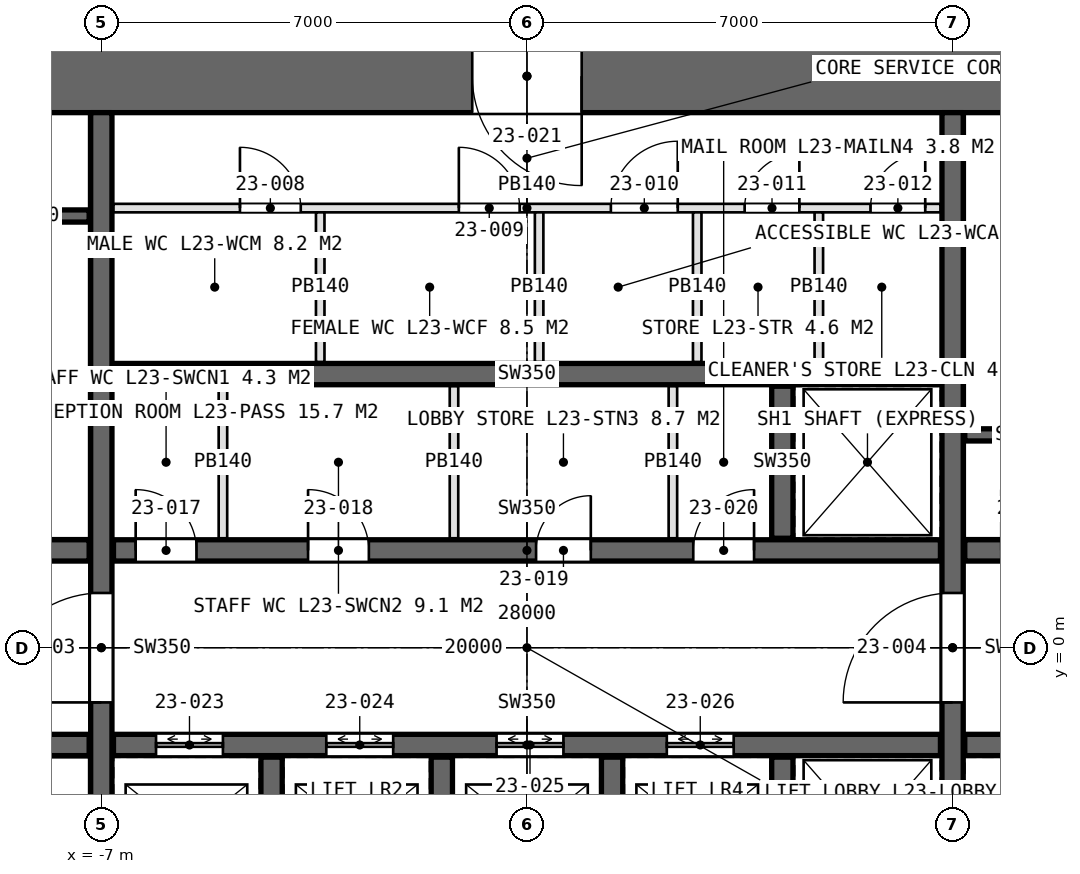
"""IFC4 building model, lengths in metres.
Left out: names, types, materials, properties, quantities, classifications, styles, units other than length and angle.
Written with IfcOpenShell. Run it as: python <this file> out.ifc"""

import sys

from ifc_helpers import new_model, si_unit, direction, frame, frame_2d, origin, place, context, subcontext, project, spatial, rectangle, extrude, element, fill, save


model = new_model("IFC4")
c1 = context("Model", 3, precision=1e-05, world=origin(), true_north=direction((0.0, 1.0)))
c2 = subcontext(c1, "Body", "Model", "MODEL_VIEW")
j1 = project(units=[si_unit("LENGTHUNIT", "METRE"), si_unit("PLANEANGLEUNIT", "RADIAN")], contexts=[c1])
p1 = place(None, origin())
s1 = spatial("IfcSite", under=j1, at=p1, CompositionType="ELEMENT")
p2 = place(p1, origin())
s2 = spatial("IfcBuilding", under=s1, at=p2, CompositionType="ELEMENT")
p3 = place(p2, frame((0.0, 0.0, 113.4)))
s3 = spatial("IfcBuildingStorey", under=s2, at=p3, CompositionType="ELEMENT", Elevation=113.4)
p4 = place(p3, frame((14.0, 9.4, 0.0), z_axis=(0.0, 0.0, 1.0), x_axis=(-1.0, 0.0, 0.0)))
e1 = element("IfcWall", 1, at=p4, inside=s3, PredefinedType="SHEAR", context=c2, shape_type="SweptSolid", body=[
    extrude(rectangle(XDim=28.0, YDim=1.2, at=frame_2d((14.0, 0.0))), origin(), (0.0, 0.0, 1.0), 4.2),
])
p5 = place(p4, frame((24.0, 0.0, 0.0)))
e2 = element("IfcOpeningElement", 2, at=p5, cuts=e1, PredefinedType="OPENING", context=c2, shape_type="SweptSolid", body=[
    extrude(rectangle(XDim=1.0, YDim=2.4, at=frame_2d((0.5, 1.2))), frame((0.0, 0.61, 0.0), z_axis=(0.0, -1.0, 0.0), x_axis=(1.0, 0.0, 0.0)), (0.0, 0.0, 1.0), 1.22),
])
p6 = place(p4, frame((13.1, 0.0, 0.0)))
e3 = element("IfcOpeningElement", 3, at=p6, cuts=e1, PredefinedType="OPENING", context=c2, shape_type="SweptSolid", body=[
    extrude(rectangle(XDim=1.8, YDim=2.4, at=frame_2d((0.9, 1.2))), frame((0.0, 0.61, 0.0), z_axis=(0.0, -1.0, 0.0), x_axis=(1.0, 0.0, 0.0)), (0.0, 0.0, 1.0), 1.22),
])
p7 = place(p3, frame((-7.0, -8.8, 0.0), z_axis=(0.0, 0.0, 1.0), x_axis=(0.0, 1.0, 0.0)))
e4 = element("IfcWall", 4, at=p7, inside=s3, PredefinedType="SHEAR", context=c2, shape_type="SweptSolid", body=[
    extrude(rectangle(XDim=17.6, YDim=0.35, at=frame_2d((8.8, 0.0))), origin(), (0.0, 0.0, 1.0), 4.2),
])
p8 = place(p7, frame((7.9, 0.0, 0.0)))
e5 = element("IfcOpeningElement", 5, at=p8, cuts=e4, PredefinedType="OPENING", context=c2, shape_type="SweptSolid", body=[
    extrude(rectangle(XDim=1.8, YDim=2.4, at=frame_2d((0.9, 1.2))), frame((0.0, 0.185, 0.0), z_axis=(0.0, -1.0, 0.0), x_axis=(1.0, 0.0, 0.0)), (0.0, 0.0, 1.0), 0.37),
])
p9 = place(p3, frame((7.0, -8.8, 0.0), z_axis=(0.0, 0.0, 1.0), x_axis=(0.0, 1.0, 0.0)))
e6 = element("IfcWall", 6, at=p9, inside=s3, PredefinedType="SHEAR", context=c2, shape_type="SweptSolid", body=[
    extrude(rectangle(XDim=17.6, YDim=0.35, at=frame_2d((8.8, 0.0))), origin(), (0.0, 0.0, 1.0), 4.2),
])
p10 = place(p9, frame((7.9, 0.0, 0.0)))
e7 = element("IfcOpeningElement", 7, at=p10, cuts=e6, PredefinedType="OPENING", context=c2, shape_type="SweptSolid", body=[
    extrude(rectangle(XDim=1.8, YDim=2.4, at=frame_2d((0.9, 1.2))), frame((0.0, 0.185, 0.0), z_axis=(0.0, -1.0, 0.0), x_axis=(1.0, 0.0, 0.0)), (0.0, 0.0, 1.0), 0.37),
])
p11 = place(p3, frame((-6.8, 1.6, 0.0), z_axis=(0.0, 0.0, 1.0), x_axis=(1.0, 0.0, 0.0)))
e8 = element("IfcWall", 8, at=p11, inside=s3, PredefinedType="SHEAR", context=c2, shape_type="SweptSolid", body=[
    extrude(rectangle(XDim=13.6, YDim=0.35, at=frame_2d((6.8, 0.0))), origin(), (0.0, 0.0, 1.0), 4.2),
])
p12 = place(p11, frame((0.365, 0.0, 0.0)))
e9 = element("IfcOpeningElement", 9, at=p12, cuts=e8, PredefinedType="OPENING", context=c2, shape_type="SweptSolid", body=[
    extrude(rectangle(XDim=1.0, YDim=2.4, at=frame_2d((0.5, 1.2))), frame((0.0, 0.185, 0.0), z_axis=(0.0, -1.0, 0.0), x_axis=(1.0, 0.0, 0.0)), (0.0, 0.0, 1.0), 0.37),
])
p13 = place(p11, frame((3.2, 0.0, 0.0)))
e10 = element("IfcOpeningElement", 10, at=p13, cuts=e8, PredefinedType="OPENING", context=c2, shape_type="SweptSolid", body=[
    extrude(rectangle(XDim=1.0, YDim=2.4, at=frame_2d((0.5, 1.2))), frame((0.0, 0.185, 0.0), z_axis=(0.0, -1.0, 0.0), x_axis=(1.0, 0.0, 0.0)), (0.0, 0.0, 1.0), 0.37),
])
p14 = place(p11, frame((6.95, 0.0, 0.0)))
e11 = element("IfcOpeningElement", 11, at=p14, cuts=e8, PredefinedType="OPENING", context=c2, shape_type="SweptSolid", body=[
    extrude(rectangle(XDim=0.9, YDim=2.4, at=frame_2d((0.45, 1.2))), frame((0.0, 0.185, 0.0), z_axis=(0.0, -1.0, 0.0), x_axis=(1.0, 0.0, 0.0)), (0.0, 0.0, 1.0), 0.37),
])
p15 = place(p11, frame((9.535, 0.0, 0.0)))
e12 = element("IfcOpeningElement", 12, at=p15, cuts=e8, PredefinedType="OPENING", context=c2, shape_type="SweptSolid", body=[
    extrude(rectangle(XDim=1.0, YDim=2.4, at=frame_2d((0.5, 1.2))), frame((0.0, 0.185, 0.0), z_axis=(0.0, -1.0, 0.0), x_axis=(1.0, 0.0, 0.0)), (0.0, 0.0, 1.0), 0.37),
])
p16 = place(p3, frame((-6.8, -1.6, 0.0), z_axis=(0.0, 0.0, 1.0), x_axis=(1.0, 0.0, 0.0)))
e13 = element("IfcWall", 13, at=p16, inside=s3, PredefinedType="SHEAR", context=c2, shape_type="SweptSolid", body=[
    extrude(rectangle(XDim=13.6, YDim=0.35, at=frame_2d((6.8, 0.0))), origin(), (0.0, 0.0, 1.0), 4.2),
])
p17 = place(p16, frame((0.7, 0.0, 0.0)))
e14 = element("IfcOpeningElement", 14, at=p17, cuts=e13, PredefinedType="OPENING", context=c2, shape_type="SweptSolid", body=[
    extrude(rectangle(XDim=1.1, YDim=2.4, at=frame_2d((0.55, 1.2))), frame((0.0, 0.185, 0.0), z_axis=(0.0, -1.0, 0.0), x_axis=(1.0, 0.0, 0.0)), (0.0, 0.0, 1.0), 0.37),
])
p18 = place(p16, frame((3.5, 0.0, 0.0)))
e15 = element("IfcOpeningElement", 15, at=p18, cuts=e13, PredefinedType="OPENING", context=c2, shape_type="SweptSolid", body=[
    extrude(rectangle(XDim=1.1, YDim=2.4, at=frame_2d((0.55, 1.2))), frame((0.0, 0.185, 0.0), z_axis=(0.0, -1.0, 0.0), x_axis=(1.0, 0.0, 0.0)), (0.0, 0.0, 1.0), 0.37),
])
p19 = place(p16, frame((6.3, 0.0, 0.0)))
e16 = element("IfcOpeningElement", 16, at=p19, cuts=e13, PredefinedType="OPENING", context=c2, shape_type="SweptSolid", body=[
    extrude(rectangle(XDim=1.1, YDim=2.4, at=frame_2d((0.55, 1.2))), frame((0.0, 0.185, 0.0), z_axis=(0.0, -1.0, 0.0), x_axis=(1.0, 0.0, 0.0)), (0.0, 0.0, 1.0), 0.37),
])
p20 = place(p16, frame((9.1, 0.0, 0.0)))
e17 = element("IfcOpeningElement", 17, at=p20, cuts=e13, PredefinedType="OPENING", context=c2, shape_type="SweptSolid", body=[
    extrude(rectangle(XDim=1.1, YDim=2.4, at=frame_2d((0.55, 1.2))), frame((0.0, 0.185, 0.0), z_axis=(0.0, -1.0, 0.0), x_axis=(1.0, 0.0, 0.0)), (0.0, 0.0, 1.0), 0.37),
])
p21 = place(p3, frame((-6.8, 4.5, 0.0), z_axis=(0.0, 0.0, 1.0), x_axis=(1.0, 0.0, 0.0)))
e18 = element("IfcWall", 18, at=p21, inside=s3, PredefinedType="SHEAR", context=c2, shape_type="SweptSolid", body=[
    extrude(rectangle(XDim=13.6, YDim=0.35, at=frame_2d((6.8, 0.0))), origin(), (0.0, 0.0, 1.0), 4.2),
])
for number, where, z_axis, x_axis in (
    (19, (-12.8, 1.6, 0.0), (0.0, 0.0, 1.0), (1.0, 0.0, 0.0)),
    (20, (-12.8, -1.6, 0.0), (0.0, 0.0, 1.0), (1.0, 0.0, 0.0)),
):
    element("IfcWall", number, at=place(p3, frame(where, z_axis=z_axis, x_axis=x_axis)), inside=s3, PredefinedType="SHEAR", context=c2, shape_type="SweptSolid", body=[
        extrude(rectangle(XDim=5.6, YDim=0.35, at=frame_2d((2.8, 0.0))), origin(), (0.0, 0.0, 1.0), 4.2),
    ])
p22 = place(p3, frame((7.2, 1.6, 0.0), z_axis=(0.0, 0.0, 1.0), x_axis=(1.0, 0.0, 0.0)))
e21 = element("IfcWall", 21, at=p22, inside=s3, PredefinedType="SHEAR", context=c2, shape_type="SweptSolid", body=[
    extrude(rectangle(XDim=5.6, YDim=0.35, at=frame_2d((2.8, 0.0))), origin(), (0.0, 0.0, 1.0), 4.2),
])
p23 = place(p22, frame((0.6, 0.0, 0.0)))
e22 = element("IfcOpeningElement", 22, at=p23, cuts=e21, PredefinedType="OPENING", context=c2, shape_type="SweptSolid", body=[
    extrude(rectangle(XDim=1.0, YDim=2.4, at=frame_2d((0.5, 1.2))), frame((0.0, 0.185, 0.0), z_axis=(0.0, -1.0, 0.0), x_axis=(1.0, 0.0, 0.0)), (0.0, 0.0, 1.0), 0.37),
])
p24 = place(p3, frame((7.2, -1.6, 0.0), z_axis=(0.0, 0.0, 1.0), x_axis=(1.0, 0.0, 0.0)))
e23 = element("IfcWall", 23, at=p24, inside=s3, PredefinedType="SHEAR", context=c2, shape_type="SweptSolid", body=[
    extrude(rectangle(XDim=5.6, YDim=0.35, at=frame_2d((2.8, 0.0))), origin(), (0.0, 0.0, 1.0), 4.2),
])
p25 = place(p24, frame((0.9, 0.0, 0.0)))
e24 = element("IfcOpeningElement", 24, at=p25, cuts=e23, PredefinedType="OPENING", context=c2, shape_type="SweptSolid", body=[
    extrude(rectangle(XDim=1.3, YDim=2.4, at=frame_2d((0.65, 1.2))), frame((0.0, 0.185, 0.0), z_axis=(0.0, -1.0, 0.0), x_axis=(1.0, 0.0, 0.0)), (0.0, 0.0, 1.0), 0.37),
])
p26 = place(p24, frame((3.9, 0.0, 0.0)))
e25 = element("IfcOpeningElement", 25, at=p26, cuts=e23, PredefinedType="OPENING", context=c2, shape_type="SweptSolid", body=[
    extrude(rectangle(XDim=1.3, YDim=2.4, at=frame_2d((0.65, 1.2))), frame((0.0, 0.185, 0.0), z_axis=(0.0, -1.0, 0.0), x_axis=(1.0, 0.0, 0.0)), (0.0, 0.0, 1.0), 0.37),
])
for number, where, z_axis, x_axis in (
    (26, (-4.2, -4.3, 0.0), (0.0, 0.0, 1.0), (0.0, 1.0, 0.0)),
    (27, (-1.4, -4.3, 0.0), (0.0, 0.0, 1.0), (0.0, 1.0, 0.0)),
    (28, (1.4, -4.3, 0.0), (0.0, 0.0, 1.0), (0.0, 1.0, 0.0)),
    (29, (4.2, 1.8, 0.0), (0.0, 0.0, 1.0), (0.0, 1.0, 0.0)),
    (30, (4.2, -4.3, 0.0), (0.0, 0.0, 1.0), (0.0, 1.0, 0.0)),
):
    element("IfcWall", number, at=place(p3, frame(where, z_axis=z_axis, x_axis=x_axis)), inside=s3, PredefinedType="SHEAR", context=c2, shape_type="SweptSolid", body=[
        extrude(rectangle(XDim=2.5, YDim=0.35, at=frame_2d((1.25, 0.0))), origin(), (0.0, 0.0, 1.0), 4.2),
    ])
p27 = place(p3, frame((-6.8, 7.23, 0.0), z_axis=(0.0, 0.0, 1.0), x_axis=(1.0, 0.0, 0.0)))
e31 = element("IfcWall", 31, at=p27, inside=s3, PredefinedType="PARTITIONING", context=c2, shape_type="SweptSolid", body=[
    extrude(rectangle(XDim=13.6, YDim=0.14, at=frame_2d((6.8, 0.0))), origin(), (0.0, 0.0, 1.0), 3.95),
])
p28 = place(p27, frame((2.08, 0.0, 0.0)))
e32 = element("IfcOpeningElement", 32, at=p28, cuts=e31, PredefinedType="OPENING", context=c2, shape_type="SweptSolid", body=[
    extrude(rectangle(XDim=1.0, YDim=2.4, at=frame_2d((0.5, 1.2))), frame((0.0, 0.08, 0.0), z_axis=(0.0, -1.0, 0.0), x_axis=(1.0, 0.0, 0.0)), (0.0, 0.0, 1.0), 0.16),
])
p29 = place(p27, frame((5.68, 0.0, 0.0)))
e33 = element("IfcOpeningElement", 33, at=p29, cuts=e31, PredefinedType="OPENING", context=c2, shape_type="SweptSolid", body=[
    extrude(rectangle(XDim=1.0, YDim=2.4, at=frame_2d((0.5, 1.2))), frame((0.0, 0.08, 0.0), z_axis=(0.0, -1.0, 0.0), x_axis=(1.0, 0.0, 0.0)), (0.0, 0.0, 1.0), 0.16),
])
p30 = place(p27, frame((8.18, 0.0, 0.0)))
e34 = element("IfcOpeningElement", 34, at=p30, cuts=e31, PredefinedType="OPENING", context=c2, shape_type="SweptSolid", body=[
    extrude(rectangle(XDim=1.1, YDim=2.4, at=frame_2d((0.55, 1.2))), frame((0.0, 0.08, 0.0), z_axis=(0.0, -1.0, 0.0), x_axis=(1.0, 0.0, 0.0)), (0.0, 0.0, 1.0), 0.16),
])
p31 = place(p27, frame((10.38, 0.0, 0.0)))
e35 = element("IfcOpeningElement", 35, at=p31, cuts=e31, PredefinedType="OPENING", context=c2, shape_type="SweptSolid", body=[
    extrude(rectangle(XDim=0.9, YDim=2.4, at=frame_2d((0.45, 1.2))), frame((0.0, 0.08, 0.0), z_axis=(0.0, -1.0, 0.0), x_axis=(1.0, 0.0, 0.0)), (0.0, 0.0, 1.0), 0.16),
])
p32 = place(p27, frame((12.45, 0.0, 0.0)))
e36 = element("IfcOpeningElement", 36, at=p32, cuts=e31, PredefinedType="OPENING", context=c2, shape_type="SweptSolid", body=[
    extrude(rectangle(XDim=0.9, YDim=2.4, at=frame_2d((0.45, 1.2))), frame((0.0, 0.08, 0.0), z_axis=(0.0, -1.0, 0.0), x_axis=(1.0, 0.0, 0.0)), (0.0, 0.0, 1.0), 0.16),
])
for number, where, z_axis, x_axis in (
    (37, (-3.4, 4.7, 0.0), (0.0, 0.0, 1.0), (0.0, 1.0, 0.0)),
    (38, (0.2, 4.7, 0.0), (0.0, 0.0, 1.0), (0.0, 1.0, 0.0)),
    (39, (2.8, 4.7, 0.0), (0.0, 0.0, 1.0), (0.0, 1.0, 0.0)),
    (40, (4.8, 4.7, 0.0), (0.0, 0.0, 1.0), (0.0, 1.0, 0.0)),
):
    element("IfcWall", number, at=place(p3, frame(where, z_axis=z_axis, x_axis=x_axis)), inside=s3, PredefinedType="PARTITIONING", context=c2, shape_type="SweptSolid", body=[
        extrude(rectangle(XDim=2.46, YDim=0.14, at=frame_2d((1.23, 0.0))), origin(), (0.0, 0.0, 1.0), 3.95),
    ])
for number, where, z_axis, x_axis in (
    (41, (-5.0, 1.8, 0.0), (0.0, 0.0, 1.0), (0.0, 1.0, 0.0)),
    (42, (-1.2, 1.8, 0.0), (0.0, 0.0, 1.0), (0.0, 1.0, 0.0)),
    (43, (2.4, 1.8, 0.0), (0.0, 0.0, 1.0), (0.0, 1.0, 0.0)),
):
    element("IfcWall", number, at=place(p3, frame(where, z_axis=z_axis, x_axis=x_axis)), inside=s3, PredefinedType="PARTITIONING", context=c2, shape_type="SweptSolid", body=[
        extrude(rectangle(XDim=2.5, YDim=0.14, at=frame_2d((1.25, 0.0))), origin(), (0.0, 0.0, 1.0), 3.95),
    ])
for number, where, z_axis, x_axis in (
    (44, (-9.15, 7.1, 0.0), (0.0, 0.0, 1.0), (1.0, 0.0, 0.0)),
    (45, (9.15, 3.5, 0.0), (0.0, 0.0, 1.0), (-1.0, 0.0, 0.0)),
):
    element("IfcWall", number, at=place(p3, frame(where, z_axis=z_axis, x_axis=x_axis)), inside=s3, PredefinedType="SOLIDWALL", context=c2, shape_type="SweptSolid", body=[
        extrude(rectangle(XDim=1.95, YDim=0.2, at=frame_2d((0.975, 0.0))), origin(), (0.0, 0.0, 1.0), 4.2),
    ])
p33 = place(p8, origin())
e46 = element("IfcDoor", 46, at=p33, inside=s3, OperationType="DOUBLE_DOOR_SINGLE_SWING", PredefinedType="DOOR", context=c2, shape_type="SweptSolid", body=[
    extrude(rectangle(XDim=1.8, YDim=2.4, at=frame_2d((0.9, 1.2))), frame((0.0, 0.025, 0.0), z_axis=(0.0, -1.0, 0.0), x_axis=(1.0, 0.0, 0.0)), (0.0, 0.0, 1.0), 0.05),
])
fill(e5, e46)
p34 = place(p10, origin())
e47 = element("IfcDoor", 47, at=p34, inside=s3, OperationType="DOUBLE_DOOR_SINGLE_SWING", PredefinedType="DOOR", context=c2, shape_type="SweptSolid", body=[
    extrude(rectangle(XDim=1.8, YDim=2.4, at=frame_2d((0.9, 1.2))), frame((0.0, 0.025, 0.0), z_axis=(0.0, -1.0, 0.0), x_axis=(1.0, 0.0, 0.0)), (0.0, 0.0, 1.0), 0.05),
])
fill(e7, e47)
p35 = place(p28, origin())
e48 = element("IfcDoor", 48, at=p35, inside=s3, OperationType="SINGLE_SWING_LEFT", PredefinedType="DOOR", context=c2, shape_type="SweptSolid", body=[
    extrude(rectangle(XDim=1.0, YDim=2.4, at=frame_2d((0.5, 1.2))), frame((0.0, 0.025, 0.0), z_axis=(0.0, -1.0, 0.0), x_axis=(1.0, 0.0, 0.0)), (0.0, 0.0, 1.0), 0.05),
])
fill(e32, e48)
p36 = place(p29, origin())
e49 = element("IfcDoor", 49, at=p36, inside=s3, OperationType="SINGLE_SWING_LEFT", PredefinedType="DOOR", context=c2, shape_type="SweptSolid", body=[
    extrude(rectangle(XDim=1.0, YDim=2.4, at=frame_2d((0.5, 1.2))), frame((0.0, 0.025, 0.0), z_axis=(0.0, -1.0, 0.0), x_axis=(1.0, 0.0, 0.0)), (0.0, 0.0, 1.0), 0.05),
])
fill(e33, e49)
p37 = place(p30, origin())
e50 = element("IfcDoor", 50, at=p37, inside=s3, OperationType="SINGLE_SWING_RIGHT", PredefinedType="DOOR", context=c2, shape_type="SweptSolid", body=[
    extrude(rectangle(XDim=1.1, YDim=2.4, at=frame_2d((0.55, 1.2))), frame((0.0, 0.025, 0.0), z_axis=(0.0, -1.0, 0.0), x_axis=(1.0, 0.0, 0.0)), (0.0, 0.0, 1.0), 0.05),
])
fill(e34, e50)
p38 = place(p31, origin())
e51 = element("IfcDoor", 51, at=p38, inside=s3, OperationType="SINGLE_SWING_RIGHT", PredefinedType="DOOR", context=c2, shape_type="SweptSolid", body=[
    extrude(rectangle(XDim=0.9, YDim=2.4, at=frame_2d((0.45, 1.2))), frame((0.0, 0.025, 0.0), z_axis=(0.0, -1.0, 0.0), x_axis=(1.0, 0.0, 0.0)), (0.0, 0.0, 1.0), 0.05),
])
fill(e35, e51)
p39 = place(p32, origin())
e52 = element("IfcDoor", 52, at=p39, inside=s3, OperationType="SINGLE_SWING_RIGHT", PredefinedType="DOOR", context=c2, shape_type="SweptSolid", body=[
    extrude(rectangle(XDim=0.9, YDim=2.4, at=frame_2d((0.45, 1.2))), frame((0.0, 0.025, 0.0), z_axis=(0.0, -1.0, 0.0), x_axis=(1.0, 0.0, 0.0)), (0.0, 0.0, 1.0), 0.05),
])
fill(e36, e52)
p40 = place(p12, origin())
e53 = element("IfcDoor", 53, at=p40, inside=s3, OperationType="SINGLE_SWING_LEFT", PredefinedType="DOOR", context=c2, shape_type="SweptSolid", body=[
    extrude(rectangle(XDim=1.0, YDim=2.4, at=frame_2d((0.5, 1.2))), frame((0.0, 0.025, 0.0), z_axis=(0.0, -1.0, 0.0), x_axis=(1.0, 0.0, 0.0)), (0.0, 0.0, 1.0), 0.05),
])
fill(e9, e53)
p41 = place(p13, origin())
e54 = element("IfcDoor", 54, at=p41, inside=s3, OperationType="SINGLE_SWING_LEFT", PredefinedType="DOOR", context=c2, shape_type="SweptSolid", body=[
    extrude(rectangle(XDim=1.0, YDim=2.4, at=frame_2d((0.5, 1.2))), frame((0.0, 0.025, 0.0), z_axis=(0.0, -1.0, 0.0), x_axis=(1.0, 0.0, 0.0)), (0.0, 0.0, 1.0), 0.05),
])
fill(e10, e54)
p42 = place(p14, origin())
e55 = element("IfcDoor", 55, at=p42, inside=s3, OperationType="SINGLE_SWING_RIGHT", PredefinedType="DOOR", context=c2, shape_type="SweptSolid", body=[
    extrude(rectangle(XDim=0.9, YDim=2.4, at=frame_2d((0.45, 1.2))), frame((0.0, 0.025, 0.0), z_axis=(0.0, -1.0, 0.0), x_axis=(1.0, 0.0, 0.0)), (0.0, 0.0, 1.0), 0.05),
])
fill(e11, e55)
p43 = place(p15, origin())
e56 = element("IfcDoor", 56, at=p43, inside=s3, OperationType="SINGLE_SWING_RIGHT", PredefinedType="DOOR", context=c2, shape_type="SweptSolid", body=[
    extrude(rectangle(XDim=1.0, YDim=2.4, at=frame_2d((0.5, 1.2))), frame((0.0, 0.025, 0.0), z_axis=(0.0, -1.0, 0.0), x_axis=(1.0, 0.0, 0.0)), (0.0, 0.0, 1.0), 0.05),
])
fill(e12, e56)
p44 = place(p6, origin())
e57 = element("IfcDoor", 57, at=p44, inside=s3, OperationType="DOUBLE_DOOR_SINGLE_SWING", PredefinedType="DOOR", context=c2, shape_type="SweptSolid", body=[
    extrude(rectangle(XDim=1.8, YDim=2.4, at=frame_2d((0.9, 1.2))), frame((0.0, 0.025, 0.0), z_axis=(0.0, -1.0, 0.0), x_axis=(1.0, 0.0, 0.0)), (0.0, 0.0, 1.0), 0.05),
])
fill(e3, e57)
p45 = place(p17, origin())
e58 = element("IfcDoor", 58, at=p45, inside=s3, OperationType="DOUBLE_DOOR_SLIDING", PredefinedType="DOOR", context=c2, shape_type="SweptSolid", body=[
    extrude(rectangle(XDim=1.1, YDim=2.4, at=frame_2d((0.55, 1.2))), frame((0.0, 0.025, 0.0), z_axis=(0.0, -1.0, 0.0), x_axis=(1.0, 0.0, 0.0)), (0.0, 0.0, 1.0), 0.05),
])
fill(e14, e58)
p46 = place(p18, origin())
e59 = element("IfcDoor", 59, at=p46, inside=s3, OperationType="DOUBLE_DOOR_SLIDING", PredefinedType="DOOR", context=c2, shape_type="SweptSolid", body=[
    extrude(rectangle(XDim=1.1, YDim=2.4, at=frame_2d((0.55, 1.2))), frame((0.0, 0.025, 0.0), z_axis=(0.0, -1.0, 0.0), x_axis=(1.0, 0.0, 0.0)), (0.0, 0.0, 1.0), 0.05),
])
fill(e15, e59)
p47 = place(p19, origin())
e60 = element("IfcDoor", 60, at=p47, inside=s3, OperationType="DOUBLE_DOOR_SLIDING", PredefinedType="DOOR", context=c2, shape_type="SweptSolid", body=[
    extrude(rectangle(XDim=1.1, YDim=2.4, at=frame_2d((0.55, 1.2))), frame((0.0, 0.025, 0.0), z_axis=(0.0, -1.0, 0.0), x_axis=(1.0, 0.0, 0.0)), (0.0, 0.0, 1.0), 0.05),
])
fill(e16, e60)
p48 = place(p20, origin())
e61 = element("IfcDoor", 61, at=p48, inside=s3, OperationType="DOUBLE_DOOR_SLIDING", PredefinedType="DOOR", context=c2, shape_type="SweptSolid", body=[
    extrude(rectangle(XDim=1.1, YDim=2.4, at=frame_2d((0.55, 1.2))), frame((0.0, 0.025, 0.0), z_axis=(0.0, -1.0, 0.0), x_axis=(1.0, 0.0, 0.0)), (0.0, 0.0, 1.0), 0.05),
])
fill(e17, e61)
save(model, sys.argv[1])
